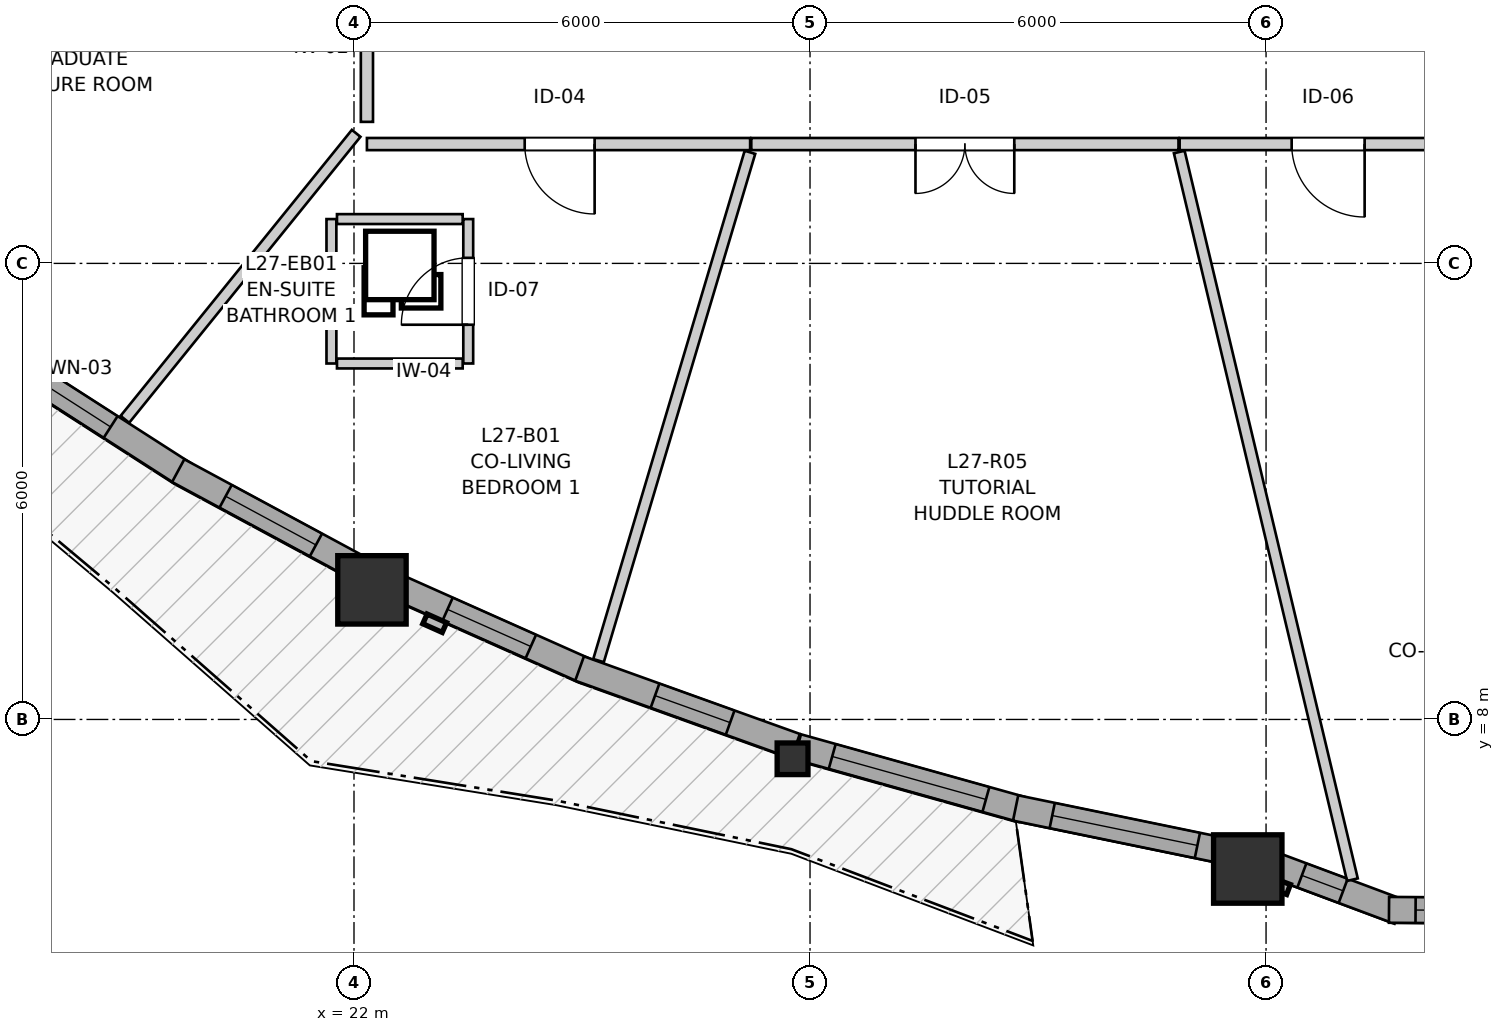
"""IFC4 building model, lengths in metres.
Left out: names, types, materials, properties, quantities, classifications, styles, units other than length and angle.
Written with IfcOpenShell. Run it as: python <this file> out.ifc"""

import sys

from ifc_helpers import new_model, si_unit, direction, frame, frame_2d, origin, origin_2d, place, context, subcontext, project, spatial, rectangle, i_section, extrude, source, transform, mapped, element, fill, save


model = new_model("IFC4")
c1 = context("Model", 3, precision=1e-05, world=origin(), true_north=direction((0.0, 1.0)))
c2 = subcontext(c1, "Body", "Model", "MODEL_VIEW")
j1 = project(units=[si_unit("LENGTHUNIT", "METRE"), si_unit("PLANEANGLEUNIT", "RADIAN")], contexts=[c1])
p1 = place(None, origin())
s1 = spatial("IfcSite", under=j1, at=p1, CompositionType="ELEMENT")
p2 = place(p1, origin())
s2 = spatial("IfcBuilding", under=s1, at=p2, CompositionType="ELEMENT")
p3 = place(p2, frame((0.0, 0.0, 92.8)))
s3 = spatial("IfcBuildingStorey", under=s2, at=p3, CompositionType="ELEMENT", Elevation=92.8)
m1 = source(origin(), c2, "Body", "SweptSolid", [
    extrude(rectangle(XDim=0.9, YDim=0.9, at=origin_2d()), origin(), (0.0, 0.0, 1.0), 2.95),
])
p4 = place(p3, frame((22.236, 9.705, 0.0), z_axis=(0.0, 0.0, 1.0), x_axis=(1.0, 0.0, 0.0)))
e1 = element("IfcColumn", 1, at=p4, inside=s3, PredefinedType="COLUMN", context=c2, shape_type="MappedRepresentation", body=[
    mapped(m1, transform((0.0, 0.0, 0.0), x_axis=(1.0, 0.0, 0.0), y_axis=(0.0, 1.0, 0.0), z_axis=(0.0, 0.0, 1.0), scale=1.0)),
])
m2 = source(origin(), c2, "Body", "SweptSolid", [
    extrude(i_section(OverallWidth=0.406, OverallDepth=0.416, WebThickness=0.027, FlangeThickness=0.044, FilletRadius=0.015, at=origin_2d()), origin(), (0.0, 0.0, 1.0), 2.95),
])
p5 = place(p3, frame((27.77, 7.483, 0.0), z_axis=(0.0, 0.0, 1.0), x_axis=(1.0, 0.0, 0.0)))
e2 = element("IfcColumn", 2, at=p5, inside=s3, PredefinedType="PILASTER", context=c2, shape_type="MappedRepresentation", body=[
    mapped(m2, transform((0.0, 0.0, 0.0), x_axis=(1.0, 0.0, 0.0), y_axis=(0.0, 1.0, 0.0), z_axis=(0.0, 0.0, 1.0), scale=1.0)),
])
p6 = place(p3, frame((33.76, 6.032, 0.0), z_axis=(0.0, 0.0, 1.0), x_axis=(1.0, 0.0, 0.0)))
e3 = element("IfcColumn", 3, at=p6, inside=s3, PredefinedType="COLUMN", context=c2, shape_type="MappedRepresentation", body=[
    mapped(m1, transform((0.0, 0.0, 0.0), x_axis=(1.0, 0.0, 0.0), y_axis=(0.0, 1.0, 0.0), z_axis=(0.0, 0.0, 1.0), scale=1.0)),
])
p7 = place(p3, frame((17.266, 12.832, 0.0), z_axis=(0.0, 0.0, 1.0), x_axis=(0.841493702039, -0.540266924241, 0.0)))
e4 = element("IfcWall", 4, at=p7, inside=s3, PredefinedType="SOLIDWALL", context=c2, shape_type="SweptSolid", body=[
    extrude(rectangle(XDim=2.968, YDim=0.34, at=frame_2d((1.484, 0.0))), origin(), (0.0, 0.0, 1.0), 2.48),
])
p8 = place(p7, frame((0.321, 0.0, 0.82)))
e5 = element("IfcOpeningElement", 5, at=p8, cuts=e4, PredefinedType="OPENING", context=c2, shape_type="SweptSolid", body=[
    extrude(rectangle(XDim=1.5, YDim=1.45, at=frame_2d((0.75, 0.725))), frame((0.0, 0.18, 0.0), z_axis=(0.0, -1.0, 0.0), x_axis=(1.0, 0.0, 0.0)), (0.0, 0.0, 1.0), 0.36),
])
p9 = place(p3, frame((19.687, 11.273, 0.0), z_axis=(0.0, 0.0, 1.0), x_axis=(0.880115534419, -0.474759566595, 0.0)))
e6 = element("IfcWall", 6, at=p9, inside=s3, PredefinedType="SOLIDWALL", context=c2, shape_type="SweptSolid", body=[
    extrude(rectangle(XDim=2.758, YDim=0.34, at=frame_2d((1.379, 0.0))), origin(), (0.0, 0.0, 1.0), 2.48),
])
p10 = place(p9, frame((0.709, 0.0, 0.82)))
e7 = element("IfcOpeningElement", 7, at=p10, cuts=e6, PredefinedType="OPENING", context=c2, shape_type="SweptSolid", body=[
    extrude(rectangle(XDim=1.35, YDim=1.45, at=frame_2d((0.675, 0.725))), frame((0.0, 0.18, 0.0), z_axis=(0.0, -1.0, 0.0), x_axis=(1.0, 0.0, 0.0)), (0.0, 0.0, 1.0), 0.36),
])
p11 = place(p3, frame((22.516, 9.767, 0.0), z_axis=(0.0, 0.0, 1.0), x_axis=(0.9134265589, -0.407003589046, 0.0)))
e8 = element("IfcWall", 8, at=p11, inside=s3, PredefinedType="SOLIDWALL", context=c2, shape_type="SweptSolid", body=[
    extrude(rectangle(XDim=2.775, YDim=0.34, at=frame_2d((1.387, 0.0))), origin(), (0.0, 0.0, 1.0), 2.48),
])
p12 = place(p11, frame((0.782, 0.0, 0.82)))
e9 = element("IfcOpeningElement", 9, at=p12, cuts=e8, PredefinedType="OPENING", context=c2, shape_type="SweptSolid", body=[
    extrude(rectangle(XDim=1.2, YDim=1.45, at=frame_2d((0.6, 0.725))), frame((0.0, 0.18, 0.0), z_axis=(0.0, -1.0, 0.0), x_axis=(1.0, 0.0, 0.0)), (0.0, 0.0, 1.0), 0.36),
])
p13 = place(p3, frame((24.968, 8.67, 0.0), z_axis=(0.0, 0.0, 1.0), x_axis=(0.941101658803, -0.33812374628, 0.0)))
e10 = element("IfcWall", 10, at=p13, inside=s3, PredefinedType="SOLIDWALL", context=c2, shape_type="SweptSolid", body=[
    extrude(rectangle(XDim=3.019, YDim=0.34, at=frame_2d((1.509, 0.0))), origin(), (0.0, 0.0, 1.0), 2.48),
])
p14 = place(p13, frame((1.055, 0.0, 0.82)))
e11 = element("IfcOpeningElement", 11, at=p14, cuts=e10, PredefinedType="OPENING", context=c2, shape_type="SweptSolid", body=[
    extrude(rectangle(XDim=1.05, YDim=1.45, at=frame_2d((0.525, 0.725))), frame((0.0, 0.18, 0.0), z_axis=(0.0, -1.0, 0.0), x_axis=(1.0, 0.0, 0.0)), (0.0, 0.0, 1.0), 0.36),
])
p15 = place(p3, frame((27.835, 7.641, 0.0), z_axis=(0.0, 0.0, 1.0), x_axis=(0.963049084537, -0.269325937802, 0.0)))
e12 = element("IfcWall", 12, at=p15, inside=s3, PredefinedType="SOLIDWALL", context=c2, shape_type="SweptSolid", body=[
    extrude(rectangle(XDim=3.068, YDim=0.34, at=frame_2d((1.534, 0.0))), origin(), (0.0, 0.0, 1.0), 2.48),
])
p16 = place(p15, frame((0.474, 0.0, 0.82)))
e13 = element("IfcOpeningElement", 13, at=p16, cuts=e12, PredefinedType="OPENING", context=c2, shape_type="SweptSolid", body=[
    extrude(rectangle(XDim=2.1, YDim=1.4, at=frame_2d((1.05, 0.7))), frame((0.0, 0.18, 0.0), z_axis=(0.0, -1.0, 0.0), x_axis=(1.0, 0.0, 0.0)), (0.0, 0.0, 1.0), 0.36),
])
p17 = place(p3, frame((30.705, 6.835, 0.0), z_axis=(0.0, 0.0, 1.0), x_axis=(0.979433750273, -0.201766024954, 0.0)))
e14 = element("IfcWall", 14, at=p17, inside=s3, PredefinedType="SOLIDWALL", context=c2, shape_type="SweptSolid", body=[
    extrude(rectangle(XDim=2.923, YDim=0.34, at=frame_2d((1.462, 0.0))), origin(), (0.0, 0.0, 1.0), 2.48),
])
p18 = place(p17, frame((0.492, 0.0, 0.82)))
e15 = element("IfcOpeningElement", 15, at=p18, cuts=e14, PredefinedType="OPENING", context=c2, shape_type="SweptSolid", body=[
    extrude(rectangle(XDim=1.95, YDim=1.4, at=frame_2d((0.975, 0.7))), frame((0.0, 0.18, 0.0), z_axis=(0.0, -1.0, 0.0), x_axis=(1.0, 0.0, 0.0)), (0.0, 0.0, 1.0), 0.36),
])
p19 = place(p3, frame((34.034, 6.111, 0.0), z_axis=(0.0, 0.0, 1.0), x_axis=(0.936815884802, -0.349822809409, 0.0)))
e16 = element("IfcWall", 16, at=p19, inside=s3, PredefinedType="SOLIDWALL", context=c2, shape_type="SweptSolid", body=[
    extrude(rectangle(XDim=1.831, YDim=0.34, at=frame_2d((0.916, 0.0))), origin(), (0.0, 0.0, 1.0), 2.48),
])
p20 = place(p19, frame((0.466, 0.0, 0.82)))
e17 = element("IfcOpeningElement", 17, at=p20, cuts=e16, PredefinedType="OPENING", context=c2, shape_type="SweptSolid", body=[
    extrude(rectangle(XDim=0.58, YDim=1.35, at=frame_2d((0.29, 0.675))), frame((0.0, 0.18, 0.0), z_axis=(0.0, -1.0, 0.0), x_axis=(1.0, 0.0, 0.0)), (0.0, 0.0, 1.0), 0.36),
])
p21 = place(p3, frame((35.618, 5.495, 0.0), z_axis=(0.0, 0.0, 1.0), x_axis=(0.999976451414, -0.006862697526, 0.0)))
e18 = element("IfcWall", 18, at=p21, inside=s3, PredefinedType="SOLIDWALL", context=c2, shape_type="SweptSolid", body=[
    extrude(rectangle(XDim=2.099, YDim=0.34, at=frame_2d((1.049, 0.0))), origin(), (0.0, 0.0, 1.0), 2.48),
])
p22 = place(p21, frame((0.35, 0.0, 0.82)))
e19 = element("IfcOpeningElement", 19, at=p22, cuts=e18, PredefinedType="OPENING", context=c2, shape_type="SweptSolid", body=[
    extrude(rectangle(XDim=1.4, YDim=1.35, at=frame_2d((0.7, 0.675))), frame((0.0, 0.18, 0.0), z_axis=(0.0, -1.0, 0.0), x_axis=(1.0, 0.0, 0.0)), (0.0, 0.0, 1.0), 0.36),
])
p23 = place(p3, frame((22.17, 15.862, 0.0), z_axis=(0.0, 0.0, 1.0), x_axis=(0.0, 1.0, 0.0)))
e20 = element("IfcWall", 20, at=p23, inside=s3, PredefinedType="PARTITIONING", context=c2, shape_type="SweptSolid", body=[
    extrude(rectangle(XDim=6.287, YDim=0.16, at=frame_2d((3.144, 0.0))), origin(), (0.0, 0.0, 1.0), 2.95),
])
p24 = place(p23, frame((2.498, 0.0, 0.0)))
e21 = element("IfcOpeningElement", 21, at=p24, cuts=e20, PredefinedType="OPENING", context=c2, shape_type="SweptSolid", body=[
    extrude(rectangle(XDim=1.3, YDim=2.1, at=frame_2d((0.65, 1.05))), frame((0.0, 0.09, 0.0), z_axis=(0.0, -1.0, 0.0), x_axis=(1.0, 0.0, 0.0)), (0.0, 0.0, 1.0), 0.18),
])
p25 = place(p3, frame((32.848, 15.57, 0.0), z_axis=(0.0, 0.0, 1.0), x_axis=(-1.0, 0.0, 0.0)))
e22 = element("IfcWall", 22, at=p25, inside=s3, PredefinedType="PARTITIONING", context=c2, shape_type="SweptSolid", body=[
    extrude(rectangle(XDim=5.621, YDim=0.16, at=frame_2d((2.811, 0.0))), origin(), (0.0, 0.0, 1.0), 2.95),
])
p26 = place(p25, frame((2.16, 0.0, 0.0)))
e23 = element("IfcOpeningElement", 23, at=p26, cuts=e22, PredefinedType="OPENING", context=c2, shape_type="SweptSolid", body=[
    extrude(rectangle(XDim=1.3, YDim=2.1, at=frame_2d((0.65, 1.05))), frame((0.0, 0.09, 0.0), z_axis=(0.0, -1.0, 0.0), x_axis=(1.0, 0.0, 0.0)), (0.0, 0.0, 1.0), 0.18),
])
p27 = place(p3, frame((27.212, 15.57, 0.0), z_axis=(0.0, 0.0, 1.0), x_axis=(-1.0, 0.0, 0.0)))
e24 = element("IfcWall", 24, at=p27, inside=s3, PredefinedType="PARTITIONING", context=c2, shape_type="SweptSolid", body=[
    extrude(rectangle(XDim=5.042, YDim=0.16, at=frame_2d((2.521, 0.0))), origin(), (0.0, 0.0, 1.0), 2.95),
])
p28 = place(p27, frame((2.046, 0.0, 0.0)))
e25 = element("IfcOpeningElement", 25, at=p28, cuts=e24, PredefinedType="OPENING", context=c2, shape_type="SweptSolid", body=[
    extrude(rectangle(XDim=0.92, YDim=2.1, at=frame_2d((0.46, 1.05))), frame((0.0, 0.09, 0.0), z_axis=(0.0, -1.0, 0.0), x_axis=(1.0, 0.0, 0.0)), (0.0, 0.0, 1.0), 0.18),
])
p29 = place(p3, frame((36.819, 15.57, 0.0), z_axis=(0.0, 0.0, 1.0), x_axis=(-1.0, 0.0, 0.0)))
e26 = element("IfcWall", 26, at=p29, inside=s3, PredefinedType="PARTITIONING", context=c2, shape_type="SweptSolid", body=[
    extrude(rectangle(XDim=3.956, YDim=0.16, at=frame_2d((1.978, 0.0))), origin(), (0.0, 0.0, 1.0), 2.95),
])
p30 = place(p29, frame((1.522, 0.0, 0.0)))
e27 = element("IfcOpeningElement", 27, at=p30, cuts=e26, PredefinedType="OPENING", context=c2, shape_type="SweptSolid", body=[
    extrude(rectangle(XDim=0.96, YDim=2.1, at=frame_2d((0.48, 1.05))), frame((0.0, 0.09, 0.0), z_axis=(0.0, -1.0, 0.0), x_axis=(1.0, 0.0, 0.0)), (0.0, 0.0, 1.0), 0.18),
])
p31 = place(p3, frame((23.503, 12.683, 0.0), z_axis=(0.0, 0.0, 1.0), x_axis=(0.0, 1.0, 0.0)))
e28 = element("IfcWall", 28, at=p31, inside=s3, PredefinedType="PARTITIONING", context=c2, shape_type="SweptSolid", body=[
    extrude(rectangle(XDim=1.9, YDim=0.13, at=frame_2d((0.95, 0.0))), origin(), (0.0, 0.0, 1.0), 2.95),
])
p32 = place(p31, frame((0.51, 0.0, 0.0)))
e29 = element("IfcOpeningElement", 29, at=p32, cuts=e28, PredefinedType="OPENING", context=c2, shape_type="SweptSolid", body=[
    extrude(rectangle(XDim=0.88, YDim=2.05, at=frame_2d((0.44, 1.025))), frame((0.0, 0.075, 0.0), z_axis=(0.0, -1.0, 0.0), x_axis=(1.0, 0.0, 0.0)), (0.0, 0.0, 1.0), 0.15),
])
p33 = place(p3, frame((32.858, 15.465, 0.0), z_axis=(0.0, 0.0, 1.0), x_axis=(0.231516552249, -0.97283096478, 0.0)))
e30 = element("IfcWall", 30, at=p33, inside=s3, PredefinedType="PARTITIONING", context=c2, shape_type="SweptSolid", body=[
    extrude(rectangle(XDim=9.841, YDim=0.145, at=frame_2d((4.92, 0.0))), origin(), (0.0, 0.0, 1.0), 2.95),
])
p34 = place(p3, frame((25.217, 8.774, 0.0), z_axis=(0.0, 0.0, 1.0), x_axis=(0.28553060174, 0.958369592313, 0.0)))
e31 = element("IfcWall", 31, at=p34, inside=s3, PredefinedType="PARTITIONING", context=c2, shape_type="SweptSolid", body=[
    extrude(rectangle(XDim=6.978, YDim=0.145, at=frame_2d((3.489, 0.0))), origin(), (0.0, 0.0, 1.0), 2.95),
])
p35 = place(p3, frame((18.986, 11.948, 0.0), z_axis=(0.0, 0.0, 1.0), x_axis=(0.628820808954, 0.777550249326, 0.0)))
e32 = element("IfcWall", 32, at=p35, inside=s3, PredefinedType="PARTITIONING", context=c2, shape_type="SweptSolid", body=[
    extrude(rectangle(XDim=4.839, YDim=0.145, at=frame_2d((2.419, 0.0))), origin(), (0.0, 0.0, 1.0), 2.95),
])
p36 = place(p3, frame((21.703, 12.683, 0.0), z_axis=(0.0, 0.0, 1.0), x_axis=(0.0, 1.0, 0.0)))
e33 = element("IfcWall", 33, at=p36, inside=s3, PredefinedType="PARTITIONING", context=c2, shape_type="SweptSolid", body=[
    extrude(rectangle(XDim=1.9, YDim=0.13, at=frame_2d((0.95, 0.0))), origin(), (0.0, 0.0, 1.0), 2.95),
])
for number, where, z_axis, x_axis in (
    (34, (21.776, 14.583, 0.0), (0.0, 0.0, 1.0), (1.0, 0.0, 0.0)),
    (35, (21.776, 12.683, 0.0), (0.0, 0.0, 1.0), (1.0, 0.0, 0.0)),
):
    element("IfcWall", number, at=place(p3, frame(where, z_axis=z_axis, x_axis=x_axis)), inside=s3, PredefinedType="PARTITIONING", context=c2, shape_type="SweptSolid", body=[
        extrude(rectangle(XDim=1.654, YDim=0.13, at=frame_2d((0.827, 0.0))), origin(), (0.0, 0.0, 1.0), 2.95),
    ])
m3 = source(origin(), c2, "Body", "SweptSolid", [
    extrude(rectangle(XDim=1.5, YDim=1.45, at=frame_2d((0.75, 0.725))), frame((0.0, 0.03, 0.0), z_axis=(0.0, -1.0, 0.0), x_axis=(1.0, 0.0, 0.0)), (0.0, 0.0, 1.0), 0.06),
])
p37 = place(p8, origin())
e36 = element("IfcWindow", 36, at=p37, inside=s3, PartitioningType="SINGLE_PANEL", PredefinedType="WINDOW", context=c2, shape_type="MappedRepresentation", body=[
    mapped(m3, transform((0.0, 0.0, 0.0), x_axis=(1.0, 0.0, 0.0), y_axis=(0.0, 1.0, 0.0), z_axis=(0.0, 0.0, 1.0), scale=1.0)),
])
fill(e5, e36)
m4 = source(origin(), c2, "Body", "SweptSolid", [
    extrude(rectangle(XDim=1.35, YDim=1.45, at=frame_2d((0.675, 0.725))), frame((0.0, 0.03, 0.0), z_axis=(0.0, -1.0, 0.0), x_axis=(1.0, 0.0, 0.0)), (0.0, 0.0, 1.0), 0.06),
])
p38 = place(p10, origin())
e37 = element("IfcWindow", 37, at=p38, inside=s3, PartitioningType="SINGLE_PANEL", PredefinedType="WINDOW", context=c2, shape_type="MappedRepresentation", body=[
    mapped(m4, transform((0.0, 0.0, 0.0), x_axis=(1.0, 0.0, 0.0), y_axis=(0.0, 1.0, 0.0), z_axis=(0.0, 0.0, 1.0), scale=1.0)),
])
fill(e7, e37)
m5 = source(origin(), c2, "Body", "SweptSolid", [
    extrude(rectangle(XDim=1.2, YDim=1.45, at=frame_2d((0.6, 0.725))), frame((0.0, 0.03, 0.0), z_axis=(0.0, -1.0, 0.0), x_axis=(1.0, 0.0, 0.0)), (0.0, 0.0, 1.0), 0.06),
])
p39 = place(p12, origin())
e38 = element("IfcWindow", 38, at=p39, inside=s3, PartitioningType="SINGLE_PANEL", PredefinedType="WINDOW", context=c2, shape_type="MappedRepresentation", body=[
    mapped(m5, transform((0.0, 0.0, 0.0), x_axis=(1.0, 0.0, 0.0), y_axis=(0.0, 1.0, 0.0), z_axis=(0.0, 0.0, 1.0), scale=1.0)),
])
fill(e9, e38)
m6 = source(origin(), c2, "Body", "SweptSolid", [
    extrude(rectangle(XDim=1.05, YDim=1.45, at=frame_2d((0.525, 0.725))), frame((0.0, 0.03, 0.0), z_axis=(0.0, -1.0, 0.0), x_axis=(1.0, 0.0, 0.0)), (0.0, 0.0, 1.0), 0.06),
])
p40 = place(p14, origin())
e39 = element("IfcWindow", 39, at=p40, inside=s3, PartitioningType="SINGLE_PANEL", PredefinedType="WINDOW", context=c2, shape_type="MappedRepresentation", body=[
    mapped(m6, transform((0.0, 0.0, 0.0), x_axis=(1.0, 0.0, 0.0), y_axis=(0.0, 1.0, 0.0), z_axis=(0.0, 0.0, 1.0), scale=1.0)),
])
fill(e11, e39)
m7 = source(origin(), c2, "Body", "SweptSolid", [
    extrude(rectangle(XDim=2.1, YDim=1.4, at=frame_2d((1.05, 0.7))), frame((0.0, 0.03, 0.0), z_axis=(0.0, -1.0, 0.0), x_axis=(1.0, 0.0, 0.0)), (0.0, 0.0, 1.0), 0.06),
])
p41 = place(p16, origin())
e40 = element("IfcWindow", 40, at=p41, inside=s3, PartitioningType="SINGLE_PANEL", PredefinedType="WINDOW", context=c2, shape_type="MappedRepresentation", body=[
    mapped(m7, transform((0.0, 0.0, 0.0), x_axis=(1.0, 0.0, 0.0), y_axis=(0.0, 1.0, 0.0), z_axis=(0.0, 0.0, 1.0), scale=1.0)),
])
fill(e13, e40)
m8 = source(origin(), c2, "Body", "SweptSolid", [
    extrude(rectangle(XDim=1.95, YDim=1.4, at=frame_2d((0.975, 0.7))), frame((0.0, 0.03, 0.0), z_axis=(0.0, -1.0, 0.0), x_axis=(1.0, 0.0, 0.0)), (0.0, 0.0, 1.0), 0.06),
])
p42 = place(p18, origin())
e41 = element("IfcWindow", 41, at=p42, inside=s3, PartitioningType="SINGLE_PANEL", PredefinedType="WINDOW", context=c2, shape_type="MappedRepresentation", body=[
    mapped(m8, transform((0.0, 0.0, 0.0), x_axis=(1.0, 0.0, 0.0), y_axis=(0.0, 1.0, 0.0), z_axis=(0.0, 0.0, 1.0), scale=1.0)),
])
fill(e15, e41)
m9 = source(origin(), c2, "Body", "SweptSolid", [
    extrude(rectangle(XDim=0.58, YDim=1.35, at=frame_2d((0.29, 0.675))), frame((0.0, 0.03, 0.0), z_axis=(0.0, -1.0, 0.0), x_axis=(1.0, 0.0, 0.0)), (0.0, 0.0, 1.0), 0.06),
])
p43 = place(p20, origin())
e42 = element("IfcWindow", 42, at=p43, inside=s3, PartitioningType="SINGLE_PANEL", PredefinedType="WINDOW", context=c2, shape_type="MappedRepresentation", body=[
    mapped(m9, transform((0.0, 0.0, 0.0), x_axis=(1.0, 0.0, 0.0), y_axis=(0.0, 1.0, 0.0), z_axis=(0.0, 0.0, 1.0), scale=1.0)),
])
fill(e17, e42)
m10 = source(origin(), c2, "Body", "SweptSolid", [
    extrude(rectangle(XDim=1.4, YDim=1.35, at=frame_2d((0.7, 0.675))), frame((0.0, 0.03, 0.0), z_axis=(0.0, -1.0, 0.0), x_axis=(1.0, 0.0, 0.0)), (0.0, 0.0, 1.0), 0.06),
])
p44 = place(p22, origin())
e43 = element("IfcWindow", 43, at=p44, inside=s3, PartitioningType="SINGLE_PANEL", PredefinedType="WINDOW", context=c2, shape_type="MappedRepresentation", body=[
    mapped(m10, transform((0.0, 0.0, 0.0), x_axis=(1.0, 0.0, 0.0), y_axis=(0.0, 1.0, 0.0), z_axis=(0.0, 0.0, 1.0), scale=1.0)),
])
fill(e19, e43)
m11 = source(origin(), c2, "Body", "SweptSolid", [
    extrude(rectangle(XDim=1.3, YDim=2.1, at=frame_2d((0.65, 1.05))), frame((0.0, 0.025, 0.0), z_axis=(0.0, -1.0, 0.0), x_axis=(1.0, 0.0, 0.0)), (0.0, 0.0, 1.0), 0.05),
])
p45 = place(p26, origin())
e44 = element("IfcDoor", 44, at=p45, inside=s3, OperationType="DOUBLE_DOOR_SINGLE_SWING", PredefinedType="DOOR", context=c2, shape_type="MappedRepresentation", body=[
    mapped(m11, transform((0.0, 0.0, 0.0), x_axis=(1.0, 0.0, 0.0), y_axis=(0.0, 1.0, 0.0), z_axis=(0.0, 0.0, 1.0), scale=1.0)),
])
fill(e23, e44)
m12 = source(origin(), c2, "Body", "SweptSolid", [
    extrude(rectangle(XDim=0.92, YDim=2.1, at=frame_2d((0.46, 1.05))), frame((0.0, 0.025, 0.0), z_axis=(0.0, -1.0, 0.0), x_axis=(1.0, 0.0, 0.0)), (0.0, 0.0, 1.0), 0.05),
])
p46 = place(p28, origin())
e45 = element("IfcDoor", 45, at=p46, inside=s3, OperationType="SINGLE_SWING_LEFT", PredefinedType="DOOR", context=c2, shape_type="MappedRepresentation", body=[
    mapped(m12, transform((0.0, 0.0, 0.0), x_axis=(1.0, 0.0, 0.0), y_axis=(0.0, 1.0, 0.0), z_axis=(0.0, 0.0, 1.0), scale=1.0)),
])
fill(e25, e45)
m13 = source(origin(), c2, "Body", "SweptSolid", [
    extrude(rectangle(XDim=0.96, YDim=2.1, at=frame_2d((0.48, 1.05))), frame((0.0, 0.025, 0.0), z_axis=(0.0, -1.0, 0.0), x_axis=(1.0, 0.0, 0.0)), (0.0, 0.0, 1.0), 0.05),
])
p47 = place(p30, origin())
e46 = element("IfcDoor", 46, at=p47, inside=s3, OperationType="SINGLE_SWING_LEFT", PredefinedType="DOOR", context=c2, shape_type="MappedRepresentation", body=[
    mapped(m13, transform((0.0, 0.0, 0.0), x_axis=(1.0, 0.0, 0.0), y_axis=(0.0, 1.0, 0.0), z_axis=(0.0, 0.0, 1.0), scale=1.0)),
])
fill(e27, e46)
m14 = source(origin(), c2, "Body", "SweptSolid", [
    extrude(rectangle(XDim=0.88, YDim=2.05, at=frame_2d((0.44, 1.025))), frame((0.0, 0.025, 0.0), z_axis=(0.0, -1.0, 0.0), x_axis=(1.0, 0.0, 0.0)), (0.0, 0.0, 1.0), 0.05),
])
p48 = place(p32, origin())
e47 = element("IfcDoor", 47, at=p48, inside=s3, OperationType="SINGLE_SWING_LEFT", PredefinedType="DOOR", context=c2, shape_type="MappedRepresentation", body=[
    mapped(m14, transform((0.0, 0.0, 0.0), x_axis=(1.0, 0.0, 0.0), y_axis=(0.0, 1.0, 0.0), z_axis=(0.0, 0.0, 1.0), scale=1.0)),
])
fill(e29, e47)
save(model, sys.argv[1])
